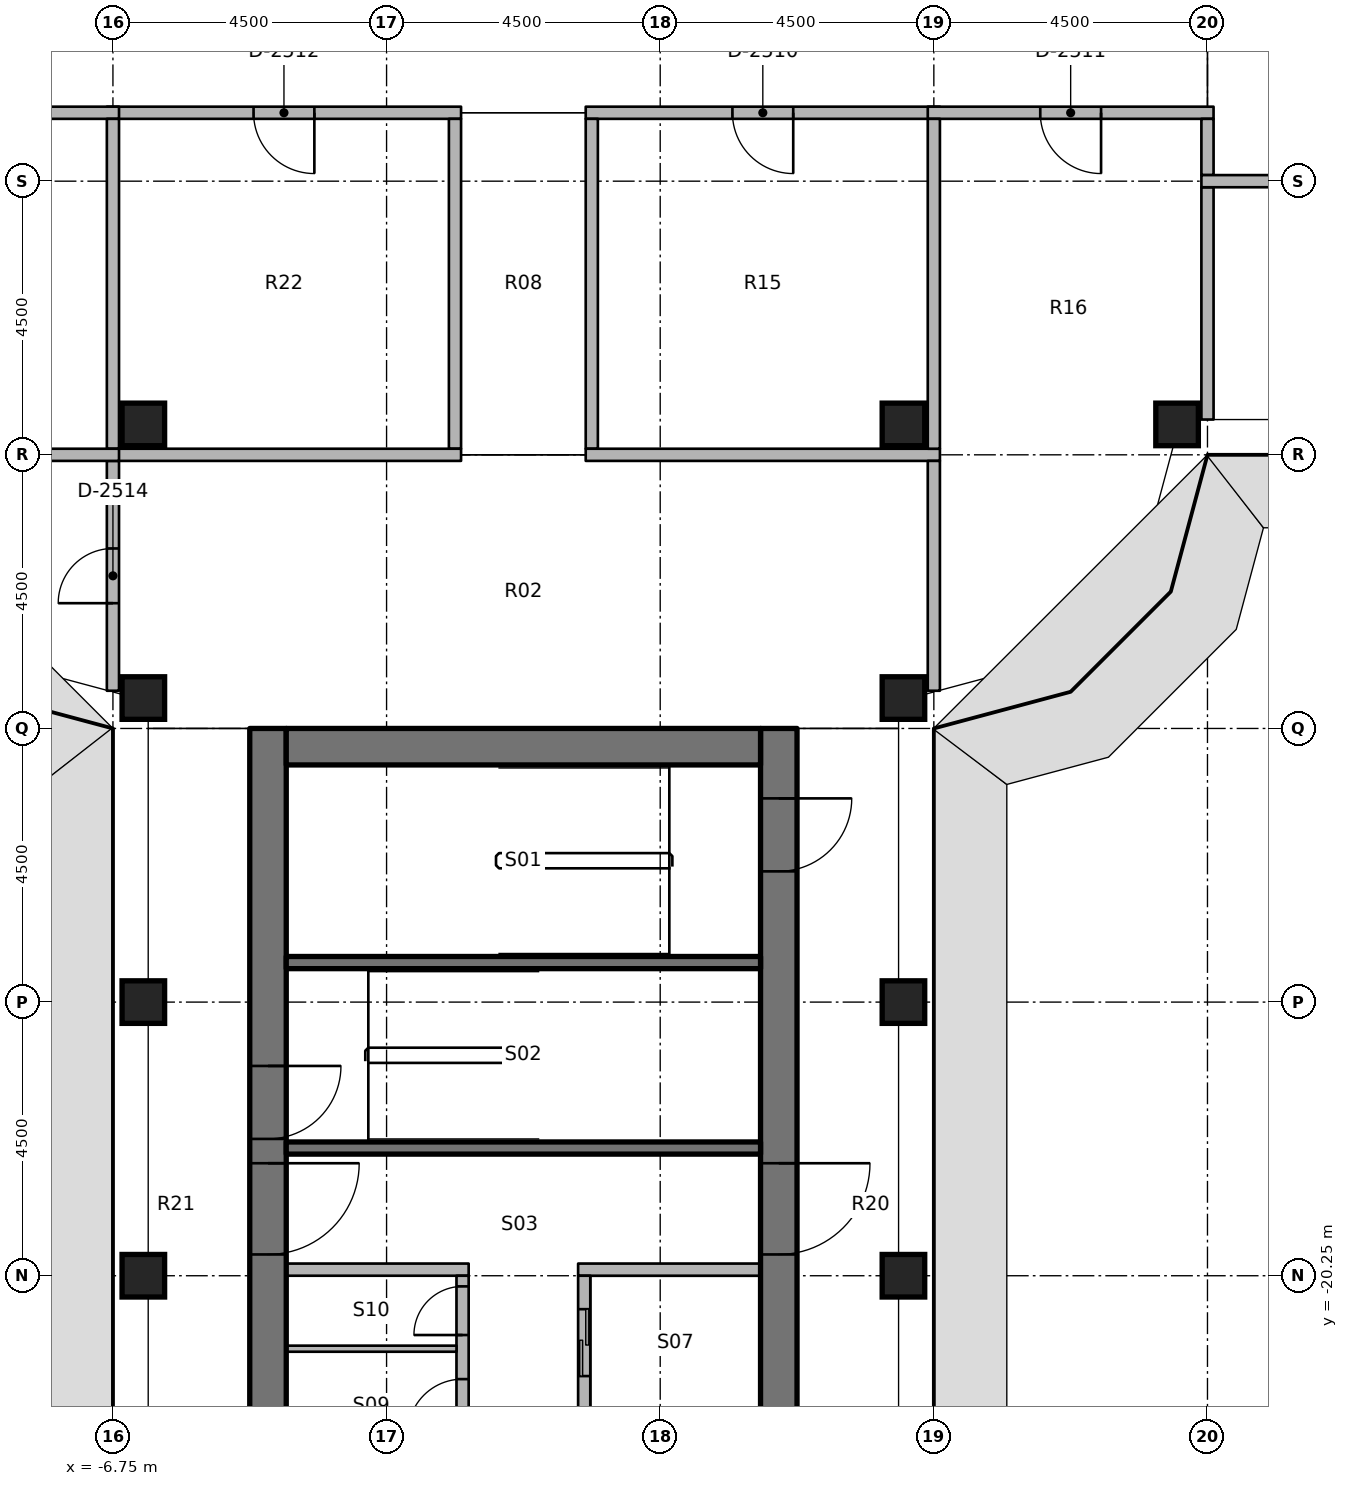
"""IFC4 building model, lengths in metres.
Left out: names, types, materials, properties, quantities, classifications, styles, units other than length and angle.
Written with IfcOpenShell. Run it as: python <this file> out.ifc"""

import sys

from ifc_helpers import new_model, si_unit, direction, frame, frame_2d, origin, origin_2d, place, context, subcontext, project, spatial, rectangle, extrude, element, fill, save


model = new_model("IFC4")
c1 = context("Model", 3, precision=1e-05, world=origin(), true_north=direction((0.0, 1.0)))
c2 = subcontext(c1, "Body", "Model", "MODEL_VIEW")
j1 = project(units=[si_unit("LENGTHUNIT", "METRE"), si_unit("PLANEANGLEUNIT", "RADIAN")], contexts=[c1])
p1 = place(None, origin())
s1 = spatial("IfcSite", under=j1, at=p1, CompositionType="ELEMENT")
p2 = place(p1, origin())
s2 = spatial("IfcBuilding", under=s1, at=p2, CompositionType="ELEMENT")
p3 = place(p2, frame((0.0, 0.0, 233.4)))
s3 = spatial("IfcBuildingStorey", under=s2, at=p3, CompositionType="ELEMENT", Elevation=233.4)
for number, where, z_axis, x_axis in (
    (1, (-6.25, -20.25, 0.0), (0.0, 0.0, 1.0), (1.0, 0.0, 0.0)),
    (2, (-6.25, -15.75, 0.0), (0.0, 0.0, 1.0), (1.0, 0.0, 0.0)),
    (3, (-6.25, -10.75, 0.0), (0.0, 0.0, 1.0), (1.0, 0.0, 0.0)),
    (4, (-6.25, -6.25, 0.0), (0.0, 0.0, 1.0), (1.0, 0.0, 0.0)),
    (5, (6.25, -20.25, 0.0), (0.0, 0.0, 1.0), (1.0, 0.0, 0.0)),
    (6, (6.25, -15.75, 0.0), (0.0, 0.0, 1.0), (1.0, 0.0, 0.0)),
    (7, (6.25, -10.75, 0.0), (0.0, 0.0, 1.0), (1.0, 0.0, 0.0)),
    (8, (6.25, -6.25, 0.0), (0.0, 0.0, 1.0), (1.0, 0.0, 0.0)),
    (9, (10.75, -6.25, 0.0), (0.0, 0.0, 1.0), (1.0, 0.0, 0.0)),
):
    element("IfcColumn", number, at=place(p3, frame(where, z_axis=z_axis, x_axis=x_axis)), inside=s3, PredefinedType="COLUMN", context=c2, shape_type="SweptSolid", body=[
        extrude(rectangle(XDim=0.7, YDim=0.7, at=origin_2d()), origin(), (0.0, 0.0, 1.0), 3.65),
    ])
p4 = place(p3, frame((-4.2, -11.25, 0.0), z_axis=(0.0, 0.0, 1.0), x_axis=(0.0, -1.0, 0.0)))
e10 = element("IfcWall", 10, at=p4, inside=s3, PredefinedType="SHEAR", context=c2, shape_type="SweptSolid", body=[
    extrude(rectangle(XDim=15.0, YDim=0.6, at=frame_2d((7.5, 0.0))), origin(), (0.0, 0.0, 1.0), 3.8),
])
p5 = place(p4, frame((7.15, 0.0, 0.0)))
e11 = element("IfcOpeningElement", 11, at=p5, cuts=e10, PredefinedType="OPENING", context=c2, shape_type="SweptSolid", body=[
    extrude(rectangle(XDim=1.5, YDim=2.3, at=frame_2d((0.75, 1.15))), frame((0.0, 0.31, 0.0), z_axis=(0.0, -1.0, 0.0), x_axis=(1.0, 0.0, 0.0)), (0.0, 0.0, 1.0), 0.62),
])
p6 = place(p4, frame((5.55, 0.0, 0.0)))
e12 = element("IfcOpeningElement", 12, at=p6, cuts=e10, PredefinedType="OPENING", context=c2, shape_type="SweptSolid", body=[
    extrude(rectangle(XDim=1.2, YDim=2.1, at=frame_2d((0.6, 1.05))), frame((0.0, 0.31, 0.0), z_axis=(0.0, -1.0, 0.0), x_axis=(1.0, 0.0, 0.0)), (0.0, 0.0, 1.0), 0.62),
])
p7 = place(p3, frame((4.2, -11.25, 0.0), z_axis=(0.0, 0.0, 1.0), x_axis=(0.0, -1.0, 0.0)))
e13 = element("IfcWall", 13, at=p7, inside=s3, PredefinedType="SHEAR", context=c2, shape_type="SweptSolid", body=[
    extrude(rectangle(XDim=15.0, YDim=0.6, at=frame_2d((7.5, 0.0))), origin(), (0.0, 0.0, 1.0), 3.8),
])
p8 = place(p7, frame((7.15, 0.0, 0.0)))
e14 = element("IfcOpeningElement", 14, at=p8, cuts=e13, PredefinedType="OPENING", context=c2, shape_type="SweptSolid", body=[
    extrude(rectangle(XDim=1.5, YDim=2.3, at=frame_2d((0.75, 1.15))), frame((0.0, 0.31, 0.0), z_axis=(0.0, -1.0, 0.0), x_axis=(1.0, 0.0, 0.0)), (0.0, 0.0, 1.0), 0.62),
])
p9 = place(p7, frame((13.9, 0.0, 0.0)))
e15 = element("IfcOpeningElement", 15, at=p9, cuts=e13, PredefinedType="OPENING", context=c2, shape_type="SweptSolid", body=[
    extrude(rectangle(XDim=0.9, YDim=2.1, at=frame_2d((0.45, 1.05))), frame((0.0, 0.31, 0.0), z_axis=(0.0, -1.0, 0.0), x_axis=(1.0, 0.0, 0.0)), (0.0, 0.0, 1.0), 0.62),
])
p10 = place(p7, frame((1.15, 0.0, 0.0)))
e16 = element("IfcOpeningElement", 16, at=p10, cuts=e13, PredefinedType="OPENING", context=c2, shape_type="SweptSolid", body=[
    extrude(rectangle(XDim=1.2, YDim=2.1, at=frame_2d((0.6, 1.05))), frame((0.0, 0.31, 0.0), z_axis=(0.0, -1.0, 0.0), x_axis=(1.0, 0.0, 0.0)), (0.0, 0.0, 1.0), 0.62),
])
p11 = place(p3, frame((-3.9, -11.55, 0.0), z_axis=(0.0, 0.0, 1.0), x_axis=(1.0, 0.0, 0.0)))
e17 = element("IfcWall", 17, at=p11, inside=s3, PredefinedType="SHEAR", context=c2, shape_type="SweptSolid", body=[
    extrude(rectangle(XDim=7.8, YDim=0.6, at=frame_2d((3.9, 0.0))), origin(), (0.0, 0.0, 1.0), 3.8),
])
for number, where, z_axis, x_axis in (
    (18, (3.9, -18.15, 0.0), (0.0, 0.0, 1.0), (-1.0, 0.0, 0.0)),
    (19, (3.9, -15.1, 0.0), (0.0, 0.0, 1.0), (-1.0, 0.0, 0.0)),
):
    element("IfcWall", number, at=place(p3, frame(where, z_axis=z_axis, x_axis=x_axis)), inside=s3, PredefinedType="SHEAR", context=c2, shape_type="SweptSolid", body=[
        extrude(rectangle(XDim=7.8, YDim=0.2, at=frame_2d((3.9, 0.0))), origin(), (0.0, 0.0, 1.0), 3.65),
    ])
p12 = place(p3, frame((3.9, -20.15, 0.0), z_axis=(0.0, 0.0, 1.0), x_axis=(-1.0, 0.0, 0.0)))
e20 = element("IfcWall", 20, at=p12, inside=s3, PredefinedType="PARTITIONING", context=c2, shape_type="SweptSolid", body=[
    extrude(rectangle(XDim=3.0, YDim=0.2, at=frame_2d((1.5, 0.0))), origin(), (0.0, 0.0, 1.0), 3.65),
])
p13 = place(p3, frame((1.0, -24.85, 0.0), z_axis=(0.0, 0.0, 1.0), x_axis=(0.0, 1.0, 0.0)))
e21 = element("IfcWall", 21, at=p13, inside=s3, PredefinedType="PARTITIONING", context=c2, shape_type="SweptSolid", body=[
    extrude(rectangle(XDim=4.6, YDim=0.2, at=frame_2d((2.3, 0.0))), origin(), (0.0, 0.0, 1.0), 3.65),
])
p14 = place(p13, frame((0.55, 0.0, 0.0)))
e22 = element("IfcOpeningElement", 22, at=p14, cuts=e21, PredefinedType="OPENING", context=c2, shape_type="SweptSolid", body=[
    extrude(rectangle(XDim=1.1, YDim=2.3, at=frame_2d((0.55, 1.15))), frame((0.0, 0.11, 0.0), z_axis=(0.0, -1.0, 0.0), x_axis=(1.0, 0.0, 0.0)), (0.0, 0.0, 1.0), 0.22),
])
p15 = place(p13, frame((2.95, 0.0, 0.0)))
e23 = element("IfcOpeningElement", 23, at=p15, cuts=e21, PredefinedType="OPENING", context=c2, shape_type="SweptSolid", body=[
    extrude(rectangle(XDim=1.1, YDim=2.3, at=frame_2d((0.55, 1.15))), frame((0.0, 0.11, 0.0), z_axis=(0.0, -1.0, 0.0), x_axis=(1.0, 0.0, 0.0)), (0.0, 0.0, 1.0), 0.22),
])
p16 = place(p3, frame((-0.9, -20.15, 0.0), z_axis=(0.0, 0.0, 1.0), x_axis=(-1.0, 0.0, 0.0)))
e24 = element("IfcWall", 24, at=p16, inside=s3, PredefinedType="PARTITIONING", context=c2, shape_type="SweptSolid", body=[
    extrude(rectangle(XDim=3.0, YDim=0.2, at=frame_2d((1.5, 0.0))), origin(), (0.0, 0.0, 1.0), 3.65),
])
p17 = place(p3, frame((-1.0, -24.85, 0.0), z_axis=(0.0, 0.0, 1.0), x_axis=(0.0, 1.0, 0.0)))
e25 = element("IfcWall", 25, at=p17, inside=s3, PredefinedType="PARTITIONING", context=c2, shape_type="SweptSolid", body=[
    extrude(rectangle(XDim=4.6, YDim=0.2, at=frame_2d((2.3, 0.0))), origin(), (0.0, 0.0, 1.0), 3.65),
])
p18 = place(p17, frame((0.275, 0.0, 0.0)))
e26 = element("IfcOpeningElement", 26, at=p18, cuts=e25, PredefinedType="OPENING", context=c2, shape_type="SweptSolid", body=[
    extrude(rectangle(XDim=0.9, YDim=2.1, at=frame_2d((0.45, 1.05))), frame((0.0, 0.11, 0.0), z_axis=(0.0, -1.0, 0.0), x_axis=(1.0, 0.0, 0.0)), (0.0, 0.0, 1.0), 0.22),
])
p19 = place(p17, frame((2.0, 0.0, 0.0)))
e27 = element("IfcOpeningElement", 27, at=p19, cuts=e25, PredefinedType="OPENING", context=c2, shape_type="SweptSolid", body=[
    extrude(rectangle(XDim=0.9, YDim=2.1, at=frame_2d((0.45, 1.05))), frame((0.0, 0.11, 0.0), z_axis=(0.0, -1.0, 0.0), x_axis=(1.0, 0.0, 0.0)), (0.0, 0.0, 1.0), 0.22),
])
p20 = place(p17, frame((3.625, 0.0, 0.0)))
e28 = element("IfcOpeningElement", 28, at=p20, cuts=e25, PredefinedType="OPENING", context=c2, shape_type="SweptSolid", body=[
    extrude(rectangle(XDim=0.8, YDim=2.1, at=frame_2d((0.4, 1.05))), frame((0.0, 0.11, 0.0), z_axis=(0.0, -1.0, 0.0), x_axis=(1.0, 0.0, 0.0)), (0.0, 0.0, 1.0), 0.22),
])
p21 = place(p3, frame((-1.1, -21.45, 0.0), z_axis=(0.0, 0.0, 1.0), x_axis=(-1.0, 0.0, 0.0)))
e29 = element("IfcWall", 29, at=p21, inside=s3, PredefinedType="PARTITIONING", context=c2, shape_type="SweptSolid", body=[
    extrude(rectangle(XDim=2.8, YDim=0.1, at=frame_2d((1.4, 0.0))), origin(), (0.0, 0.0, 1.0), 3.65),
])
p22 = place(p3, frame((6.85, -1.125, 0.0), z_axis=(0.0, 0.0, 1.0), x_axis=(-1.0, 0.0, 0.0)))
e30 = element("IfcWall", 30, at=p22, inside=s3, PredefinedType="PARTITIONING", context=c2, shape_type="SweptSolid", body=[
    extrude(rectangle(XDim=5.825, YDim=0.2, at=frame_2d((2.913, 0.0))), origin(), (0.0, 0.0, 1.0), 2.746),
])
p23 = place(p22, frame((2.413, 0.0, 0.0)))
e31 = element("IfcOpeningElement", 31, at=p23, cuts=e30, PredefinedType="OPENING", context=c2, shape_type="SweptSolid", body=[
    extrude(rectangle(XDim=1.0, YDim=2.1, at=frame_2d((0.5, 1.05))), frame((0.0, 0.11, 0.0), z_axis=(0.0, -1.0, 0.0), x_axis=(1.0, 0.0, 0.0)), (0.0, 0.0, 1.0), 0.22),
])
p24 = place(p3, frame((11.35, -1.125, 0.0), z_axis=(0.0, 0.0, 1.0), x_axis=(-1.0, 0.0, 0.0)))
e32 = element("IfcWall", 32, at=p24, inside=s3, PredefinedType="PARTITIONING", context=c2, shape_type="SweptSolid", body=[
    extrude(rectangle(XDim=4.7, YDim=0.2, at=frame_2d((2.35, 0.0))), origin(), (0.0, 0.0, 1.0), 2.746),
])
p25 = place(p24, frame((1.85, 0.0, 0.0)))
e33 = element("IfcOpeningElement", 33, at=p25, cuts=e32, PredefinedType="OPENING", context=c2, shape_type="SweptSolid", body=[
    extrude(rectangle(XDim=1.0, YDim=2.1, at=frame_2d((0.5, 1.05))), frame((0.0, 0.11, 0.0), z_axis=(0.0, -1.0, 0.0), x_axis=(1.0, 0.0, 0.0)), (0.0, 0.0, 1.0), 0.22),
])
p26 = place(p3, frame((-1.025, -1.125, 0.0), z_axis=(0.0, 0.0, 1.0), x_axis=(-1.0, 0.0, 0.0)))
e34 = element("IfcWall", 34, at=p26, inside=s3, PredefinedType="PARTITIONING", context=c2, shape_type="SweptSolid", body=[
    extrude(rectangle(XDim=5.825, YDim=0.2, at=frame_2d((2.913, 0.0))), origin(), (0.0, 0.0, 1.0), 2.746),
])
p27 = place(p26, frame((2.413, 0.0, 0.0)))
e35 = element("IfcOpeningElement", 35, at=p27, cuts=e34, PredefinedType="OPENING", context=c2, shape_type="SweptSolid", body=[
    extrude(rectangle(XDim=1.0, YDim=2.1, at=frame_2d((0.5, 1.05))), frame((0.0, 0.11, 0.0), z_axis=(0.0, -1.0, 0.0), x_axis=(1.0, 0.0, 0.0)), (0.0, 0.0, 1.0), 0.22),
])
p28 = place(p3, frame((-6.65, -1.125, 0.0), z_axis=(0.0, 0.0, 1.0), x_axis=(-1.0, 0.0, 0.0)))
e36 = element("IfcWall", 36, at=p28, inside=s3, PredefinedType="PARTITIONING", context=c2, shape_type="SweptSolid", body=[
    extrude(rectangle(XDim=4.7, YDim=0.2, at=frame_2d((2.35, 0.0))), origin(), (0.0, 0.0, 1.0), 2.746),
])
p29 = place(p28, frame((1.85, 0.0, 0.0)))
e37 = element("IfcOpeningElement", 37, at=p29, cuts=e36, PredefinedType="OPENING", context=c2, shape_type="SweptSolid", body=[
    extrude(rectangle(XDim=1.0, YDim=2.1, at=frame_2d((0.5, 1.05))), frame((0.0, 0.11, 0.0), z_axis=(0.0, -1.0, 0.0), x_axis=(1.0, 0.0, 0.0)), (0.0, 0.0, 1.0), 0.22),
])
for number, where, z_axis, x_axis in (
    (38, (1.125, -6.65, 0.0), (0.0, 0.0, 1.0), (0.0, 1.0, 0.0)),
    (39, (-1.125, -6.65, 0.0), (0.0, 0.0, 1.0), (0.0, 1.0, 0.0)),
):
    element("IfcWall", number, at=place(p3, frame(where, z_axis=z_axis, x_axis=x_axis)), inside=s3, PredefinedType="PARTITIONING", context=c2, shape_type="SweptSolid", body=[
        extrude(rectangle(XDim=5.425, YDim=0.2, at=frame_2d((2.712, 0.0))), origin(), (0.0, 0.0, 1.0), 2.746),
    ])
p30 = place(p3, frame((1.025, -6.75, 0.0), z_axis=(0.0, 0.0, 1.0), x_axis=(1.0, 0.0, 0.0)))
e40 = element("IfcWall", 40, at=p30, inside=s3, PredefinedType="PARTITIONING", context=c2, shape_type="SweptSolid", body=[
    extrude(rectangle(XDim=5.825, YDim=0.2, at=frame_2d((2.913, 0.0))), origin(), (0.0, 0.0, 1.0), 2.746),
])
p31 = place(p3, frame((6.75, -10.63, 0.0), z_axis=(0.0, 0.0, 1.0), x_axis=(0.0, 1.0, 0.0)))
e41 = element("IfcWall", 41, at=p31, inside=s3, PredefinedType="PARTITIONING", context=c2, shape_type="SweptSolid", body=[
    extrude(rectangle(XDim=3.78, YDim=0.2, at=frame_2d((1.89, 0.0))), origin(), (0.0, 0.0, 1.0), 2.746),
])
p32 = place(p3, frame((-6.85, -6.75, 0.0), z_axis=(0.0, 0.0, 1.0), x_axis=(1.0, 0.0, 0.0)))
e42 = element("IfcWall", 42, at=p32, inside=s3, PredefinedType="PARTITIONING", context=c2, shape_type="SweptSolid", body=[
    extrude(rectangle(XDim=5.825, YDim=0.2, at=frame_2d((2.913, 0.0))), origin(), (0.0, 0.0, 1.0), 2.746),
])
p33 = place(p3, frame((-6.75, -10.63, 0.0), z_axis=(0.0, 0.0, 1.0), x_axis=(0.0, 1.0, 0.0)))
e43 = element("IfcWall", 43, at=p33, inside=s3, PredefinedType="PARTITIONING", context=c2, shape_type="SweptSolid", body=[
    extrude(rectangle(XDim=3.78, YDim=0.2, at=frame_2d((1.89, 0.0))), origin(), (0.0, 0.0, 1.0), 2.746),
])
p34 = place(p33, frame((1.44, 0.0, 0.0)))
e44 = element("IfcOpeningElement", 44, at=p34, cuts=e43, PredefinedType="OPENING", context=c2, shape_type="SweptSolid", body=[
    extrude(rectangle(XDim=0.9, YDim=2.1, at=frame_2d((0.45, 1.05))), frame((0.0, 0.11, 0.0), z_axis=(0.0, -1.0, 0.0), x_axis=(1.0, 0.0, 0.0)), (0.0, 0.0, 1.0), 0.22),
])
p35 = place(p3, frame((6.75, -6.65, 0.0), z_axis=(0.0, 0.0, 1.0), x_axis=(0.0, 1.0, 0.0)))
e45 = element("IfcWall", 45, at=p35, inside=s3, PredefinedType="PARTITIONING", context=c2, shape_type="SweptSolid", body=[
    extrude(rectangle(XDim=5.425, YDim=0.2, at=frame_2d((2.712, 0.0))), origin(), (0.0, 0.0, 1.0), 2.746),
])
p36 = place(p3, frame((11.25, -2.15, 0.0), z_axis=(0.0, 0.0, 1.0), x_axis=(0.0, 1.0, 0.0)))
e46 = element("IfcWall", 46, at=p36, inside=s3, PredefinedType="PARTITIONING", context=c2, shape_type="SweptSolid", body=[
    extrude(rectangle(XDim=0.925, YDim=0.2, at=frame_2d((0.462, 0.0))), origin(), (0.0, 0.0, 1.0), 2.746),
])
p37 = place(p3, frame((11.25, -6.17, 0.0), z_axis=(0.0, 0.0, 1.0), x_axis=(0.0, 1.0, 0.0)))
e47 = element("IfcWall", 47, at=p37, inside=s3, PredefinedType="PARTITIONING", context=c2, shape_type="SweptSolid", body=[
    extrude(rectangle(XDim=3.82, YDim=0.2, at=frame_2d((1.91, 0.0))), origin(), (0.0, 0.0, 1.0), 2.746),
])
p38 = place(p3, frame((-6.75, -6.65, 0.0), z_axis=(0.0, 0.0, 1.0), x_axis=(0.0, 1.0, 0.0)))
e48 = element("IfcWall", 48, at=p38, inside=s3, PredefinedType="PARTITIONING", context=c2, shape_type="SweptSolid", body=[
    extrude(rectangle(XDim=5.425, YDim=0.2, at=frame_2d((2.712, 0.0))), origin(), (0.0, 0.0, 1.0), 2.746),
])
p39 = place(p3, frame((-11.35, -6.75, 0.0), z_axis=(0.0, 0.0, 1.0), x_axis=(1.0, 0.0, 0.0)))
e49 = element("IfcWall", 49, at=p39, inside=s3, PredefinedType="PARTITIONING", context=c2, shape_type="SweptSolid", body=[
    extrude(rectangle(XDim=4.7, YDim=0.2, at=frame_2d((2.35, 0.0))), origin(), (0.0, 0.0, 1.0), 2.746),
])
p40 = place(p3, frame((15.85, -2.25, 0.0), z_axis=(0.0, 0.0, 1.0), x_axis=(-1.0, 0.0, 0.0)))
e50 = element("IfcWall", 50, at=p40, inside=s3, PredefinedType="PARTITIONING", context=c2, shape_type="SweptSolid", body=[
    extrude(rectangle(XDim=4.7, YDim=0.2, at=frame_2d((2.35, 0.0))), origin(), (0.0, 0.0, 1.0), 2.746),
])
p41 = place(p40, frame((1.85, 0.0, 0.0)))
e51 = element("IfcOpeningElement", 51, at=p41, cuts=e50, PredefinedType="OPENING", context=c2, shape_type="SweptSolid", body=[
    extrude(rectangle(XDim=1.0, YDim=2.1, at=frame_2d((0.5, 1.05))), frame((0.0, 0.11, 0.0), z_axis=(0.0, -1.0, 0.0), x_axis=(1.0, 0.0, 0.0)), (0.0, 0.0, 1.0), 0.22),
])
p42 = place(p8, origin())
e52 = element("IfcDoor", 52, at=p42, inside=s3, OperationType="DOUBLE_DOOR_SINGLE_SWING", PredefinedType="DOOR", context=c2, shape_type="SweptSolid", body=[
    extrude(rectangle(XDim=1.5, YDim=2.3, at=frame_2d((0.75, 1.15))), frame((0.0, 0.025, 0.0), z_axis=(0.0, -1.0, 0.0), x_axis=(1.0, 0.0, 0.0)), (0.0, 0.0, 1.0), 0.05),
])
fill(e14, e52)
p43 = place(p5, origin())
e53 = element("IfcDoor", 53, at=p43, inside=s3, OperationType="DOUBLE_DOOR_SINGLE_SWING", PredefinedType="DOOR", context=c2, shape_type="SweptSolid", body=[
    extrude(rectangle(XDim=1.5, YDim=2.3, at=frame_2d((0.75, 1.15))), frame((0.0, 0.025, 0.0), z_axis=(0.0, -1.0, 0.0), x_axis=(1.0, 0.0, 0.0)), (0.0, 0.0, 1.0), 0.05),
])
fill(e11, e53)
p44 = place(p6, origin())
e54 = element("IfcDoor", 54, at=p44, inside=s3, OperationType="SINGLE_SWING_RIGHT", PredefinedType="DOOR", context=c2, shape_type="SweptSolid", body=[
    extrude(rectangle(XDim=1.2, YDim=2.1, at=frame_2d((0.6, 1.05))), frame((0.0, 0.025, 0.0), z_axis=(0.0, -1.0, 0.0), x_axis=(1.0, 0.0, 0.0)), (0.0, 0.0, 1.0), 0.05),
])
fill(e12, e54)
p45 = place(p10, origin())
e55 = element("IfcDoor", 55, at=p45, inside=s3, OperationType="SINGLE_SWING_LEFT", PredefinedType="DOOR", context=c2, shape_type="SweptSolid", body=[
    extrude(rectangle(XDim=1.2, YDim=2.1, at=frame_2d((0.6, 1.05))), frame((0.0, 0.025, 0.0), z_axis=(0.0, -1.0, 0.0), x_axis=(1.0, 0.0, 0.0)), (0.0, 0.0, 1.0), 0.05),
])
fill(e16, e55)
p46 = place(p15, origin())
e56 = element("IfcDoor", 56, at=p46, inside=s3, OperationType="DOUBLE_DOOR_SLIDING", PredefinedType="DOOR", context=c2, shape_type="SweptSolid", body=[
    extrude(rectangle(XDim=1.1, YDim=2.3, at=frame_2d((0.55, 1.15))), frame((0.0, 0.025, 0.0), z_axis=(0.0, -1.0, 0.0), x_axis=(1.0, 0.0, 0.0)), (0.0, 0.0, 1.0), 0.05),
])
fill(e23, e56)
p47 = place(p19, origin())
e57 = element("IfcDoor", 57, at=p47, inside=s3, OperationType="SINGLE_SWING_LEFT", PredefinedType="DOOR", context=c2, shape_type="SweptSolid", body=[
    extrude(rectangle(XDim=0.9, YDim=2.1, at=frame_2d((0.45, 1.05))), frame((0.0, 0.025, 0.0), z_axis=(0.0, -1.0, 0.0), x_axis=(1.0, 0.0, 0.0)), (0.0, 0.0, 1.0), 0.05),
])
fill(e27, e57)
p48 = place(p20, origin())
e58 = element("IfcDoor", 58, at=p48, inside=s3, OperationType="SINGLE_SWING_RIGHT", PredefinedType="DOOR", context=c2, shape_type="SweptSolid", body=[
    extrude(rectangle(XDim=0.8, YDim=2.1, at=frame_2d((0.4, 1.05))), frame((0.0, 0.025, 0.0), z_axis=(0.0, -1.0, 0.0), x_axis=(1.0, 0.0, 0.0)), (0.0, 0.0, 1.0), 0.05),
])
fill(e28, e58)
p49 = place(p23, origin())
e59 = element("IfcDoor", 59, at=p49, inside=s3, OperationType="SINGLE_SWING_RIGHT", PredefinedType="DOOR", context=c2, shape_type="SweptSolid", body=[
    extrude(rectangle(XDim=1.0, YDim=2.1, at=frame_2d((0.5, 1.05))), frame((0.0, 0.025, 0.0), z_axis=(0.0, -1.0, 0.0), x_axis=(1.0, 0.0, 0.0)), (0.0, 0.0, 1.0), 0.05),
])
fill(e31, e59)
p50 = place(p25, origin())
e60 = element("IfcDoor", 60, at=p50, inside=s3, OperationType="SINGLE_SWING_RIGHT", PredefinedType="DOOR", context=c2, shape_type="SweptSolid", body=[
    extrude(rectangle(XDim=1.0, YDim=2.1, at=frame_2d((0.5, 1.05))), frame((0.0, 0.025, 0.0), z_axis=(0.0, -1.0, 0.0), x_axis=(1.0, 0.0, 0.0)), (0.0, 0.0, 1.0), 0.05),
])
fill(e33, e60)
p51 = place(p27, origin())
e61 = element("IfcDoor", 61, at=p51, inside=s3, OperationType="SINGLE_SWING_RIGHT", PredefinedType="DOOR", context=c2, shape_type="SweptSolid", body=[
    extrude(rectangle(XDim=1.0, YDim=2.1, at=frame_2d((0.5, 1.05))), frame((0.0, 0.025, 0.0), z_axis=(0.0, -1.0, 0.0), x_axis=(1.0, 0.0, 0.0)), (0.0, 0.0, 1.0), 0.05),
])
fill(e35, e61)
p52 = place(p34, origin())
e62 = element("IfcDoor", 62, at=p52, inside=s3, OperationType="SINGLE_SWING_RIGHT", PredefinedType="DOOR", context=c2, shape_type="SweptSolid", body=[
    extrude(rectangle(XDim=0.9, YDim=2.1, at=frame_2d((0.45, 1.05))), frame((0.0, 0.025, 0.0), z_axis=(0.0, -1.0, 0.0), x_axis=(1.0, 0.0, 0.0)), (0.0, 0.0, 1.0), 0.05),
])
fill(e44, e62)
save(model, sys.argv[1])
